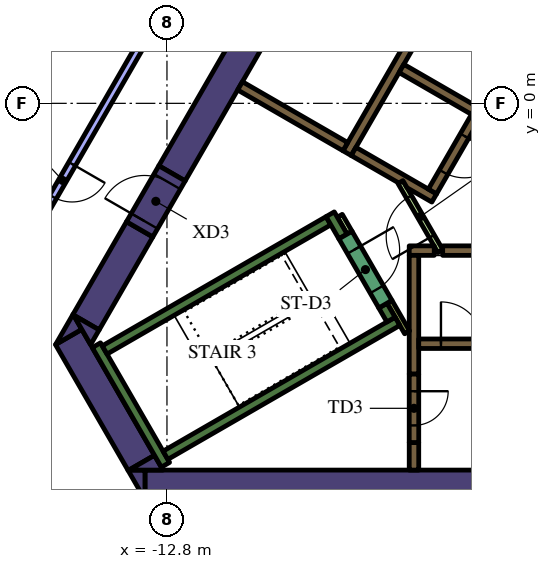
"""IFC4 building model, lengths in metres.
Left out: names, types, materials, properties, quantities, classifications, styles, units other than length and angle.
Written with IfcOpenShell. Run it as: python <this file> out.ifc"""

import sys

from ifc_helpers import new_model, si_unit, direction, frame, frame_2d, origin, place, context, subcontext, project, spatial, polyline, rectangle, outline, extrude, element, fill, save


model = new_model("IFC4")
c1 = context("Model", 3, precision=1e-05, world=origin(), true_north=direction((0.0, 1.0)))
c2 = subcontext(c1, "Body", "Model", "MODEL_VIEW")
j1 = project(units=[si_unit("LENGTHUNIT", "METRE"), si_unit("PLANEANGLEUNIT", "RADIAN")], contexts=[c1])
p1 = place(None, origin())
s1 = spatial("IfcSite", under=j1, at=p1, CompositionType="ELEMENT")
p2 = place(p1, origin())
s2 = spatial("IfcBuilding", under=s1, at=p2, CompositionType="ELEMENT")
p3 = place(p2, frame((0.0, 0.0, 154.2)))
s3 = spatial("IfcBuildingStorey", under=s2, at=p3, CompositionType="ELEMENT", Elevation=154.2)
p4 = place(p3, frame((-13.378, -10.05, 0.0), z_axis=(0.0, 0.0, 1.0), x_axis=(1.0, 0.0, 0.0)))
e1 = element("IfcWall", 1, at=p4, inside=s3, PredefinedType="SOLIDWALL", context=c2, shape_type="SweptSolid", body=[
    extrude(rectangle(XDim=22.282, YDim=0.8, at=frame_2d((11.141, 0.0))), origin(), (0.0, 0.0, 1.0), 4.2),
])
p5 = place(p3, origin())
e2 = element("IfcWall", 2, at=p5, inside=s3, PredefinedType="SOLIDWALL", context=c2, shape_type="SweptSolid", body=[
    extrude(outline(polyline([(-13.828, -9.65), (-13.38, -9.65), (-13.38, -10.426), (-13.828, -9.65)])), origin(), (0.0, 0.0, 1.0), 4.2),
])
p6 = place(p3, frame((-15.387, -6.148, 0.0), z_axis=(0.0, 0.0, 1.0), x_axis=(0.499984020225, -0.866034629516, 0.0)))
e3 = element("IfcWall", 3, at=p6, inside=s3, PredefinedType="SOLIDWALL", context=c2, shape_type="SweptSolid", body=[
    extrude(rectangle(XDim=3.824, YDim=0.8, at=frame_2d((1.912, 0.0))), origin(), (0.0, 0.0, 1.0), 4.2),
])
e4 = element("IfcWall", 4, at=p5, inside=s3, PredefinedType="SOLIDWALL", context=c2, shape_type="SweptSolid", body=[
    extrude(outline(polyline([(-15.042, -5.947), (-15.729, -6.343), (-15.271, -5.55), (-15.042, -5.947)])), origin(), (0.0, 0.0, 1.0), 4.2),
])
e5 = element("IfcWall", 5, at=p5, inside=s3, PredefinedType="SOLIDWALL", context=c2, shape_type="SweptSolid", body=[
    extrude(outline(polyline([(-12.904, -9.65), (-13.8, -9.65), (-13.128, -9.262), (-12.904, -9.65)])), origin(), (0.0, 0.0, 1.0), 4.2),
])
p7 = place(p3, frame((-13.518, -3.314, 0.0), z_axis=(0.0, 0.0, 1.0), x_axis=(-0.499969377405, -0.866043083026, 0.0)))
e6 = element("IfcWall", 6, at=p7, inside=s3, PredefinedType="SOLIDWALL", context=c2, shape_type="SweptSolid", body=[
    extrude(rectangle(XDim=2.824, YDim=0.8, at=frame_2d((1.412, 0.0))), origin(), (0.0, 0.0, 1.0), 4.2),
])
e7 = element("IfcWall", 7, at=p5, inside=s3, PredefinedType="SOLIDWALL", context=c2, shape_type="SweptSolid", body=[
    extrude(outline(polyline([(-14.809, -6.35), (-15.257, -5.574), (-14.585, -5.962), (-14.809, -6.35)])), origin(), (0.0, 0.0, 1.0), 4.2),
])
p8 = place(p3, frame((-12.668, -1.842, 0.0), z_axis=(0.0, 0.0, 1.0), x_axis=(0.500003640647, 0.866023301845, 0.0)))
e8 = element("IfcWall", 8, at=p8, inside=s3, PredefinedType="SOLIDWALL", context=c2, shape_type="SweptSolid", body=[
    extrude(rectangle(XDim=15.858, YDim=0.8, at=frame_2d((7.929, 0.0))), origin(), (0.0, 0.0, 1.0), 4.2),
])
p9 = place(p3, frame((-12.84, -9.511, 0.0), z_axis=(0.0, 0.0, 1.0), x_axis=(-0.499997733992, 0.866026712061, 0.0)))
e9 = element("IfcWall", 9, at=p9, inside=s3, PredefinedType="SOLIDWALL", context=c2, shape_type="SweptSolid", body=[
    extrude(rectangle(XDim=3.634, YDim=0.25, at=frame_2d((1.817, 0.0))), origin(), (0.0, 0.0, 1.0), 4.2),
])
p10 = place(p3, frame((-14.44, -6.49, 0.0), z_axis=(0.0, 0.0, 1.0), x_axis=(0.866022966069, 0.500004222222, 0.0)))
e10 = element("IfcWall", 10, at=p10, inside=s3, PredefinedType="SOLIDWALL", context=c2, shape_type="SweptSolid", body=[
    extrude(rectangle(XDim=6.8, YDim=0.25, at=frame_2d((3.4, 0.0))), origin(), (0.0, 0.0, 1.0), 4.2),
])
p11 = place(p3, frame((-8.168, -3.503, 0.0), z_axis=(0.0, 0.0, 1.0), x_axis=(-0.499952099219, 0.866053057547, 0.0)))
e11 = element("IfcWall", 11, at=p11, inside=s3, PredefinedType="SOLIDWALL", context=c2, shape_type="SweptSolid", body=[
    extrude(rectangle(XDim=0.675, YDim=0.25, at=frame_2d((0.337, 0.0))), origin(), (0.0, 0.0, 1.0), 4.2),
])
p12 = place(p3, frame((-12.84, -9.261, 0.0), z_axis=(0.0, 0.0, 1.0), x_axis=(0.866016039709, 0.500016218704, 0.0)))
e12 = element("IfcWall", 12, at=p12, inside=s3, PredefinedType="SOLIDWALL", context=c2, shape_type="SweptSolid", body=[
    extrude(rectangle(XDim=7.05, YDim=0.25, at=frame_2d((3.525, 0.0))), origin(), (0.0, 0.0, 1.0), 4.2),
])
p13 = place(p3, frame((-6.905, -5.69, 0.0), z_axis=(0.0, 0.0, 1.0), x_axis=(-0.500402024738, 0.865793170242, 0.0)))
e13 = element("IfcWall", 13, at=p13, inside=s3, PredefinedType="SOLIDWALL", context=c2, shape_type="SweptSolid", body=[
    extrude(rectangle(XDim=0.425, YDim=0.25, at=frame_2d((0.212, 0.0))), origin(), (0.0, 0.0, 1.0), 4.2),
])
p14 = place(p3, frame((-6.3, -8.925, 0.0), z_axis=(0.0, 0.0, 1.0), x_axis=(0.0, -1.0, 0.0)))
e14 = element("IfcWall", 14, at=p14, inside=s3, PredefinedType="SOLIDWALL", context=c2, shape_type="SweptSolid", body=[
    extrude(rectangle(XDim=0.725, YDim=0.25, at=frame_2d((0.363, 0.0))), origin(), (0.0, 0.0, 1.0), 4.2),
])
p15 = place(p3, frame((-5.545, -3.875, 0.0), z_axis=(0.0, 0.0, 1.0), x_axis=(1.0, 0.0, 0.0)))
e15 = element("IfcWall", 15, at=p15, inside=s3, PredefinedType="SOLIDWALL", context=c2, shape_type="SweptSolid", body=[
    extrude(rectangle(XDim=11.97, YDim=0.25, at=frame_2d((5.985, 0.0))), origin(), (0.0, 0.0, 1.0), 4.2),
])
p16 = place(p3, frame((-6.425, -3.875, 0.0), z_axis=(0.0, 0.0, 1.0), x_axis=(1.0, 0.0, 0.0)))
e16 = element("IfcWall", 16, at=p16, inside=s3, PredefinedType="SOLIDWALL", context=c2, shape_type="SweptSolid", body=[
    extrude(rectangle(XDim=0.658, YDim=0.25, at=frame_2d((0.329, 0.0))), origin(), (0.0, 0.0, 1.0), 4.2),
])
p17 = place(p3, frame((-6.3, -7.125, 0.0), z_axis=(0.0, 0.0, 1.0), x_axis=(0.0, 1.0, 0.0)))
e17 = element("IfcWall", 17, at=p17, inside=s3, PredefinedType="SOLIDWALL", context=c2, shape_type="SweptSolid", body=[
    extrude(rectangle(XDim=3.125, YDim=0.25, at=frame_2d((1.562, 0.0))), origin(), (0.0, 0.0, 1.0), 4.2),
])
p18 = place(p3, frame((-8.06, -1.311, 0.0), z_axis=(0.0, 0.0, 1.0), x_axis=(0.50000273126, 0.866023826885, 0.0)))
e18 = element("IfcWall", 18, at=p18, inside=s3, PredefinedType="SOLIDWALL", context=c2, shape_type="SweptSolid", body=[
    extrude(rectangle(XDim=10.33, YDim=0.25, at=frame_2d((5.165, 0.0))), origin(), (0.0, 0.0, 1.0), 4.2),
])
p19 = place(p3, frame((-4.724, -0.182, 0.0), z_axis=(0.0, 0.0, 1.0), x_axis=(-0.866008176907, 0.50002983664, 0.0)))
e19 = element("IfcWall", 19, at=p19, inside=s3, PredefinedType="SOLIDWALL", context=c2, shape_type="SweptSolid", body=[
    extrude(rectangle(XDim=2.2, YDim=0.25, at=frame_2d((1.1, 0.0))), origin(), (0.0, 0.0, 1.0), 4.2),
])
e20 = element("IfcWall", 20, at=p5, inside=s3, PredefinedType="SOLIDWALL", context=c2, shape_type="SweptSolid", body=[
    extrude(outline(polyline([(-5.922, -2.257), (-5.922, -2.257), (-5.705, -2.382), (-5.83, -2.598), (-6.483, -2.221), (-6.591, -2.033), (-6.591, -2.033), (-6.7, -2.096), (-7.952, -1.373), (-7.827, -1.156), (-5.922, -2.257)])), origin(), (0.0, 0.0, 1.0), 4.2),
])
p20 = place(p3, frame((-8.106, -1.14, 0.0), z_axis=(0.0, 0.0, 1.0), x_axis=(-0.866008981251, 0.500028443584, 0.0)))
e21 = element("IfcWall", 21, at=p20, inside=s3, PredefinedType="SOLIDWALL", context=c2, shape_type="SweptSolid", body=[
    extrude(rectangle(XDim=3.2, YDim=0.25, at=frame_2d((1.6, 0.0))), origin(), (0.0, 0.0, 1.0), 4.2),
])
p21 = place(p3, frame((-8.252, -2.958, 0.0), z_axis=(0.0, 0.0, 1.0), x_axis=(0.500174715838, -0.865924508047, 0.0)))
e22 = element("IfcWall", 22, at=p21, inside=s3, PredefinedType="PARTITIONING", context=c2, shape_type="SweptSolid", body=[
    extrude(rectangle(XDim=0.514, YDim=0.15, at=frame_2d((0.257, 0.0))), origin(), (0.0, 0.0, 1.0), 3.15),
])
p22 = place(p3, frame((-6.48, -6.027, 0.0), z_axis=(0.0, 0.0, 1.0), x_axis=(-0.499927229454, 0.866067413802, 0.0)))
e23 = element("IfcWall", 23, at=p22, inside=s3, PredefinedType="PARTITIONING", context=c2, shape_type="SweptSolid", body=[
    extrude(rectangle(XDim=0.929, YDim=0.15, at=frame_2d((0.464, 0.0))), origin(), (0.0, 0.0, 1.0), 4.2),
])
p23 = place(p3, frame((-6.175, -6.325, 0.0), z_axis=(0.0, 0.0, 1.0), x_axis=(1.0, 0.0, 0.0)))
e24 = element("IfcWall", 24, at=p23, inside=s3, PredefinedType="SOLIDWALL", context=c2, shape_type="SweptSolid", body=[
    extrude(rectangle(XDim=12.35, YDim=0.25, at=frame_2d((6.175, 0.0))), origin(), (0.0, 0.0, 1.0), 4.2),
])
p24 = place(p23, frame((0.585, 0.0, 0.0)))
e25 = element("IfcOpeningElement", 25, at=p24, cuts=e24, PredefinedType="OPENING", context=c2, shape_type="SweptSolid", body=[
    extrude(rectangle(XDim=1.1, YDim=2.1, at=frame_2d((0.55, 1.05))), frame((0.0, 0.135, 0.0), z_axis=(0.0, -1.0, 0.0), x_axis=(1.0, 0.0, 0.0)), (0.0, 0.0, 1.0), 0.27),
])
p25 = place(p23, frame((3.105, 0.0, 0.0)))
e26 = element("IfcOpeningElement", 26, at=p25, cuts=e24, PredefinedType="OPENING", context=c2, shape_type="SweptSolid", body=[
    extrude(rectangle(XDim=1.1, YDim=2.1, at=frame_2d((0.55, 1.05))), frame((0.0, 0.135, 0.0), z_axis=(0.0, -1.0, 0.0), x_axis=(1.0, 0.0, 0.0)), (0.0, 0.0, 1.0), 0.27),
])
p26 = place(p23, frame((5.625, 0.0, 0.0)))
e27 = element("IfcOpeningElement", 27, at=p26, cuts=e24, PredefinedType="OPENING", context=c2, shape_type="SweptSolid", body=[
    extrude(rectangle(XDim=1.1, YDim=2.1, at=frame_2d((0.55, 1.05))), frame((0.0, 0.135, 0.0), z_axis=(0.0, -1.0, 0.0), x_axis=(1.0, 0.0, 0.0)), (0.0, 0.0, 1.0), 0.27),
])
p27 = place(p23, frame((8.145, 0.0, 0.0)))
e28 = element("IfcOpeningElement", 28, at=p27, cuts=e24, PredefinedType="OPENING", context=c2, shape_type="SweptSolid", body=[
    extrude(rectangle(XDim=1.1, YDim=2.1, at=frame_2d((0.55, 1.05))), frame((0.0, 0.135, 0.0), z_axis=(0.0, -1.0, 0.0), x_axis=(1.0, 0.0, 0.0)), (0.0, 0.0, 1.0), 0.27),
])
p28 = place(p23, frame((10.665, 0.0, 0.0)))
e29 = element("IfcOpeningElement", 29, at=p28, cuts=e24, PredefinedType="OPENING", context=c2, shape_type="SweptSolid", body=[
    extrude(rectangle(XDim=1.1, YDim=2.1, at=frame_2d((0.55, 1.05))), frame((0.0, 0.135, 0.0), z_axis=(0.0, -1.0, 0.0), x_axis=(1.0, 0.0, 0.0)), (0.0, 0.0, 1.0), 0.27),
])
p29 = place(p3, frame((-0.898, 6.194, 0.0), z_axis=(0.0, 0.0, 1.0), x_axis=(-0.499996202215, -0.866027596426, 0.0)))
e30 = element("IfcWall", 30, at=p29, inside=s3, PredefinedType="SOLIDWALL", context=c2, shape_type="SweptSolid", body=[
    extrude(rectangle(XDim=9.83, YDim=0.25, at=frame_2d((4.915, 0.0))), origin(), (0.0, 0.0, 1.0), 4.2),
])
p30 = place(p29, frame((0.585, 0.0, 0.0)))
e31 = element("IfcOpeningElement", 31, at=p30, cuts=e30, PredefinedType="OPENING", context=c2, shape_type="SweptSolid", body=[
    extrude(rectangle(XDim=1.1, YDim=2.1, at=frame_2d((0.55, 1.05))), frame((0.0, 0.135, 0.0), z_axis=(0.0, -1.0, 0.0), x_axis=(1.0, 0.0, 0.0)), (0.0, 0.0, 1.0), 0.27),
])
p31 = place(p29, frame((3.105, 0.0, 0.0)))
e32 = element("IfcOpeningElement", 32, at=p31, cuts=e30, PredefinedType="OPENING", context=c2, shape_type="SweptSolid", body=[
    extrude(rectangle(XDim=1.1, YDim=2.1, at=frame_2d((0.55, 1.05))), frame((0.0, 0.135, 0.0), z_axis=(0.0, -1.0, 0.0), x_axis=(1.0, 0.0, 0.0)), (0.0, 0.0, 1.0), 0.27),
])
p32 = place(p29, frame((5.625, 0.0, 0.0)))
e33 = element("IfcOpeningElement", 33, at=p32, cuts=e30, PredefinedType="OPENING", context=c2, shape_type="SweptSolid", body=[
    extrude(rectangle(XDim=1.1, YDim=2.1, at=frame_2d((0.55, 1.05))), frame((0.0, 0.135, 0.0), z_axis=(0.0, -1.0, 0.0), x_axis=(1.0, 0.0, 0.0)), (0.0, 0.0, 1.0), 0.27),
])
p33 = place(p29, frame((8.145, 0.0, 0.0)))
e34 = element("IfcOpeningElement", 34, at=p33, cuts=e30, PredefinedType="OPENING", context=c2, shape_type="SweptSolid", body=[
    extrude(rectangle(XDim=1.1, YDim=2.1, at=frame_2d((0.55, 1.05))), frame((0.0, 0.135, 0.0), z_axis=(0.0, -1.0, 0.0), x_axis=(1.0, 0.0, 0.0)), (0.0, 0.0, 1.0), 0.27),
])
p34 = place(p3, frame((-8.103, -3.466, 0.0), z_axis=(0.0, 0.0, 1.0), x_axis=(0.500078061341, -0.865980330357, 0.0)))
e35 = element("IfcWall", 35, at=p34, inside=s3, PredefinedType="SOLIDWALL", context=c2, shape_type="SweptSolid", body=[
    extrude(rectangle(XDim=2.1, YDim=0.4, at=frame_2d((1.05, 0.0))), origin(), (0.0, 0.0, 1.0), 4.2),
])
p35 = place(p34, frame((0.45, 0.0, 0.0)))
e36 = element("IfcOpeningElement", 36, at=p35, cuts=e35, PredefinedType="OPENING", context=c2, shape_type="SweptSolid", body=[
    extrude(rectangle(XDim=1.2, YDim=2.1, at=frame_2d((0.6, 1.05))), frame((0.0, 0.21, 0.0), z_axis=(0.0, -1.0, 0.0), x_axis=(1.0, 0.0, 0.0)), (0.0, 0.0, 1.0), 0.42),
])
p36 = place(p3, frame((-6.3, -7.125, 0.0), z_axis=(0.0, 0.0, 1.0), x_axis=(0.0, -1.0, 0.0)))
e37 = element("IfcWall", 37, at=p36, inside=s3, PredefinedType="SOLIDWALL", context=c2, shape_type="SweptSolid", body=[
    extrude(rectangle(XDim=1.8, YDim=0.25, at=frame_2d((0.9, 0.0))), origin(), (0.0, 0.0, 1.0), 4.2),
])
p37 = place(p36, frame((0.45, 0.0, 0.0)))
e38 = element("IfcOpeningElement", 38, at=p37, cuts=e37, PredefinedType="OPENING", context=c2, shape_type="SweptSolid", body=[
    extrude(rectangle(XDim=0.9, YDim=2.1, at=frame_2d((0.45, 1.05))), frame((0.0, 0.135, 0.0), z_axis=(0.0, -1.0, 0.0), x_axis=(1.0, 0.0, 0.0)), (0.0, 0.0, 1.0), 0.27),
])
p38 = place(p3, frame((-5.606, -3.89, 0.0), z_axis=(0.0, 0.0, 1.0), x_axis=(-0.500027713859, 0.866009402589, 0.0)))
e39 = element("IfcWall", 39, at=p38, inside=s3, PredefinedType="PARTITIONING", context=c2, shape_type="SweptSolid", body=[
    extrude(rectangle(XDim=2.1, YDim=0.15, at=frame_2d((1.05, 0.0))), origin(), (0.0, 0.0, 1.0), 3.15),
])
p39 = place(p38, frame((0.45, 0.0, 0.0)))
e40 = element("IfcOpeningElement", 40, at=p39, cuts=e39, PredefinedType="OPENING", context=c2, shape_type="SweptSolid", body=[
    extrude(rectangle(XDim=1.2, YDim=2.1, at=frame_2d((0.6, 1.05))), frame((0.0, 0.085, 0.0), z_axis=(0.0, -1.0, 0.0), x_axis=(1.0, 0.0, 0.0)), (0.0, 0.0, 1.0), 0.17),
])
p40 = place(p3, frame((-13.518, -3.314, 0.0), z_axis=(0.0, 0.0, 1.0), x_axis=(0.500062241894, 0.865989465428, 0.0)))
e41 = element("IfcWall", 41, at=p40, inside=s3, PredefinedType="SOLIDWALL", context=c2, shape_type="SweptSolid", body=[
    extrude(rectangle(XDim=1.7, YDim=0.8, at=frame_2d((0.85, 0.0))), origin(), (0.0, 0.0, 1.0), 4.2),
])
p41 = place(p40, frame((0.25, 0.0, 0.0)))
e42 = element("IfcOpeningElement", 42, at=p41, cuts=e41, PredefinedType="OPENING", context=c2, shape_type="SweptSolid", body=[
    extrude(rectangle(XDim=1.2, YDim=2.1, at=frame_2d((0.6, 1.05))), frame((0.0, 0.41, 0.0), z_axis=(0.0, -1.0, 0.0), x_axis=(1.0, 0.0, 0.0)), (0.0, 0.0, 1.0), 0.82),
])
p42 = place(p3, frame((-13.047, 2.302, 0.0), z_axis=(0.0, 0.0, 1.0), x_axis=(-0.499986873641, -0.866032982159, 0.0)))
e43 = element("IfcWall", 43, at=p42, inside=s3, PredefinedType="PARTITIONING", context=c2, shape_type="SweptSolid", body=[
    extrude(rectangle(XDim=9.99, YDim=0.2, at=frame_2d((4.995, 0.0))), origin(), (0.0, 0.0, 1.0), 3.15),
])
p43 = place(p42, frame((4.5, 0.0, 0.0)))
e44 = element("IfcOpeningElement", 44, at=p43, cuts=e43, PredefinedType="OPENING", context=c2, shape_type="SweptSolid", body=[
    extrude(rectangle(XDim=1.0, YDim=2.1, at=frame_2d((0.5, 1.05))), frame((0.0, 0.11, 0.0), z_axis=(0.0, -1.0, 0.0), x_axis=(1.0, 0.0, 0.0)), (0.0, 0.0, 1.0), 0.22),
])
p44 = place(p24, origin())
e45 = element("IfcDoor", 45, at=p44, inside=s3, OperationType="DOUBLE_DOOR_SLIDING", PredefinedType="DOOR", context=c2, shape_type="SweptSolid", body=[
    extrude(rectangle(XDim=1.1, YDim=2.1, at=frame_2d((0.55, 1.05))), frame((0.0, 0.025, 0.0), z_axis=(0.0, -1.0, 0.0), x_axis=(1.0, 0.0, 0.0)), (0.0, 0.0, 1.0), 0.05),
])
fill(e25, e45)
p45 = place(p33, origin())
e46 = element("IfcDoor", 46, at=p45, inside=s3, OperationType="DOUBLE_DOOR_SLIDING", PredefinedType="DOOR", context=c2, shape_type="SweptSolid", body=[
    extrude(rectangle(XDim=1.1, YDim=2.1, at=frame_2d((0.55, 1.05))), frame((0.0, 0.025, 0.0), z_axis=(0.0, -1.0, 0.0), x_axis=(1.0, 0.0, 0.0)), (0.0, 0.0, 1.0), 0.05),
])
fill(e34, e46)
p46 = place(p35, origin())
e47 = element("IfcDoor", 47, at=p46, inside=s3, OperationType="SINGLE_SWING_LEFT", PredefinedType="DOOR", context=c2, shape_type="SweptSolid", body=[
    extrude(rectangle(XDim=1.2, YDim=2.1, at=frame_2d((0.6, 1.05))), frame((0.0, 0.025, 0.0), z_axis=(0.0, -1.0, 0.0), x_axis=(1.0, 0.0, 0.0)), (0.0, 0.0, 1.0), 0.05),
])
fill(e36, e47)
p47 = place(p37, origin())
e48 = element("IfcDoor", 48, at=p47, inside=s3, OperationType="SINGLE_SWING_LEFT", PredefinedType="DOOR", context=c2, shape_type="SweptSolid", body=[
    extrude(rectangle(XDim=0.9, YDim=2.1, at=frame_2d((0.45, 1.05))), frame((0.0, 0.025, 0.0), z_axis=(0.0, -1.0, 0.0), x_axis=(1.0, 0.0, 0.0)), (0.0, 0.0, 1.0), 0.05),
])
fill(e38, e48)
p48 = place(p39, origin())
e49 = element("IfcDoor", 49, at=p48, inside=s3, OperationType="SINGLE_SWING_LEFT", PredefinedType="DOOR", context=c2, shape_type="SweptSolid", body=[
    extrude(rectangle(XDim=1.2, YDim=2.1, at=frame_2d((0.6, 1.05))), frame((0.0, 0.025, 0.0), z_axis=(0.0, -1.0, 0.0), x_axis=(1.0, 0.0, 0.0)), (0.0, 0.0, 1.0), 0.05),
])
fill(e40, e49)
p49 = place(p41, origin())
e50 = element("IfcDoor", 50, at=p49, inside=s3, OperationType="SINGLE_SWING_LEFT", PredefinedType="DOOR", context=c2, shape_type="SweptSolid", body=[
    extrude(rectangle(XDim=1.2, YDim=2.1, at=frame_2d((0.6, 1.05))), frame((0.0, 0.025, 0.0), z_axis=(0.0, -1.0, 0.0), x_axis=(1.0, 0.0, 0.0)), (0.0, 0.0, 1.0), 0.05),
])
fill(e42, e50)
p50 = place(p43, origin())
e51 = element("IfcDoor", 51, at=p50, inside=s3, OperationType="SINGLE_SWING_RIGHT", PredefinedType="DOOR", context=c2, shape_type="SweptSolid", body=[
    extrude(rectangle(XDim=1.0, YDim=2.1, at=frame_2d((0.5, 1.05))), frame((0.0, 0.025, 0.0), z_axis=(0.0, -1.0, 0.0), x_axis=(1.0, 0.0, 0.0)), (0.0, 0.0, 1.0), 0.05),
])
fill(e44, e51)
save(model, sys.argv[1])
